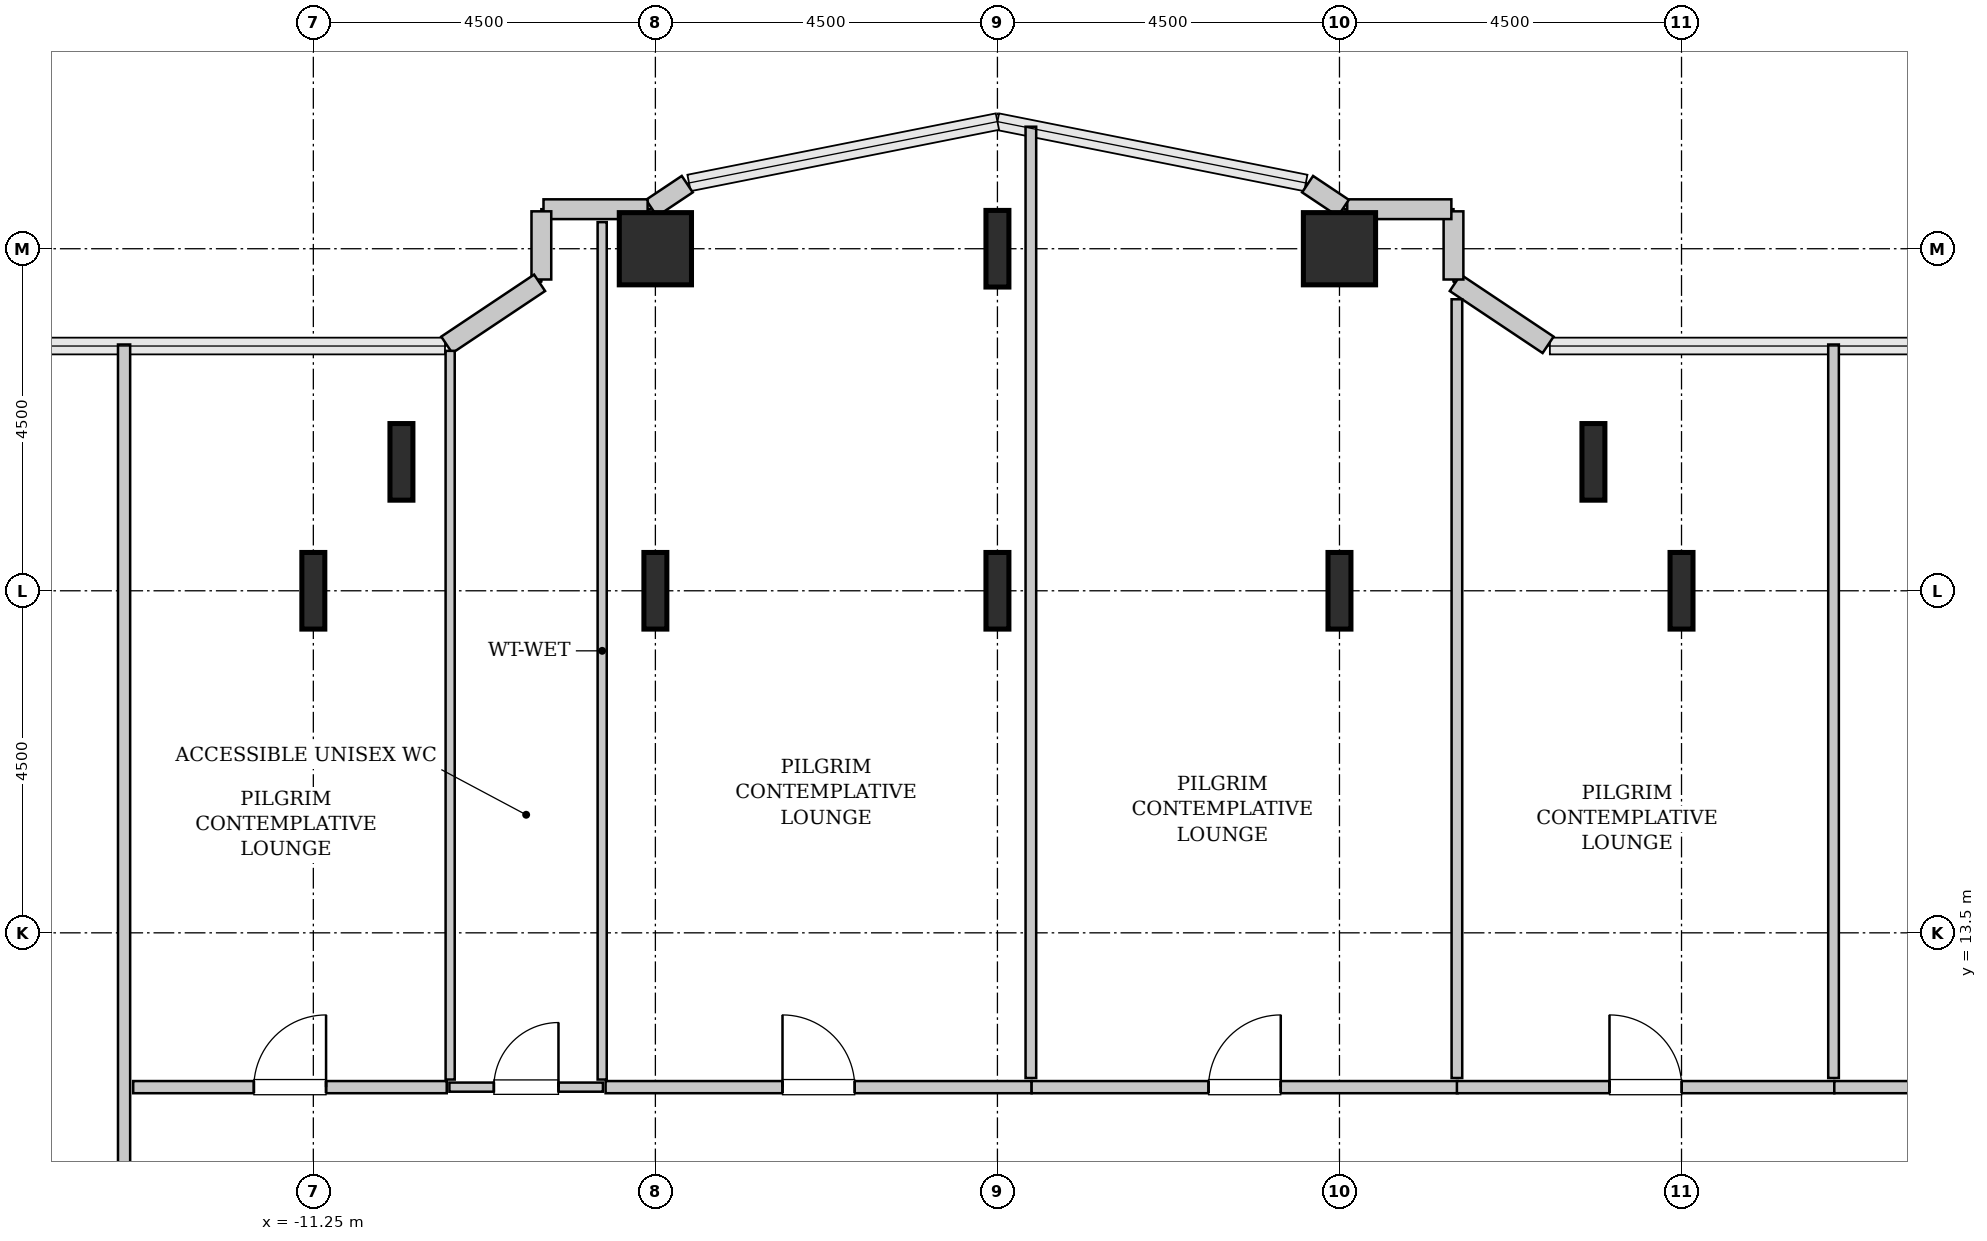
"""IFC4 building model, lengths in metres.
Left out: names, types, materials, properties, quantities, classifications, styles, units other than length and angle.
Written with IfcOpenShell. Run it as: python <this file> out.ifc"""

import sys

from ifc_helpers import new_model, si_unit, direction, frame, frame_2d, origin, origin_2d, place, context, subcontext, project, spatial, rectangle, hollow_rectangle, i_section, extrude, source, transform, mapped, element, fill, save


model = new_model("IFC4")
c1 = context("Model", 3, precision=1e-05, world=origin(), true_north=direction((0.0, 1.0)))
c2 = subcontext(c1, "Body", "Model", "MODEL_VIEW")
j1 = project(units=[si_unit("LENGTHUNIT", "METRE"), si_unit("PLANEANGLEUNIT", "RADIAN")], contexts=[c1])
p1 = place(None, origin())
s1 = spatial("IfcSite", under=j1, at=p1, CompositionType="ELEMENT")
p2 = place(p1, origin())
s2 = spatial("IfcBuilding", under=s1, at=p2, CompositionType="ELEMENT")
p3 = place(p2, frame((0.0, 0.0, 82.4)))
s3 = spatial("IfcBuildingStorey", under=s2, at=p3, CompositionType="ELEMENT", Elevation=82.4)
m1 = source(origin(), c2, "Body", "SweptSolid", [
    extrude(i_section(OverallWidth=0.302, OverallDepth=1.008, WebThickness=0.021, FlangeThickness=0.04, FilletRadius=0.03, at=origin_2d()), origin(), (0.0, 0.0, 1.0), 3.8),
])
for number, where, z_axis, x_axis in (
    (1, (-11.25, 18.0, 0.0), (0.0, 0.0, 1.0), (1.0, 0.0, 0.0)),
    (2, (-10.091, 19.696, 0.0), (0.0, 0.0, 1.0), (1.0, 0.0, 0.0)),
    (3, (-6.75, 18.0, 0.0), (0.0, 0.0, 1.0), (1.0, 0.0, 0.0)),
):
    element("IfcColumn", number, at=place(p3, frame(where, z_axis=z_axis, x_axis=x_axis)), inside=s3, PredefinedType="COLUMN", context=c2, shape_type="MappedRepresentation", body=[
        mapped(m1, transform((0.0, 0.0, 0.0), x_axis=(1.0, 0.0, 0.0), y_axis=(0.0, 1.0, 0.0), z_axis=(0.0, 0.0, 1.0), scale=1.0)),
    ])
m2 = source(origin(), c2, "Body", "SweptSolid", [
    extrude(hollow_rectangle(XDim=0.95, YDim=0.95, WallThickness=0.045, InnerFilletRadius=0.045, OuterFilletRadius=0.09, at=origin_2d()), origin(), (0.0, 0.0, 1.0), 3.8),
])
p4 = place(p3, frame((-6.75, 22.5, 0.0), z_axis=(0.0, 0.0, 1.0), x_axis=(1.0, 0.0, 0.0)))
e4 = element("IfcColumn", 4, at=p4, inside=s3, PredefinedType="COLUMN", context=c2, shape_type="MappedRepresentation", body=[
    mapped(m2, transform((0.0, 0.0, 0.0), x_axis=(1.0, 0.0, 0.0), y_axis=(0.0, 1.0, 0.0), z_axis=(0.0, 0.0, 1.0), scale=1.0)),
])
for number, where, z_axis, x_axis in (
    (5, (-2.25, 18.0, 0.0), (0.0, 0.0, 1.0), (1.0, 0.0, 0.0)),
    (6, (-2.25, 22.5, 0.0), (0.0, 0.0, 1.0), (1.0, 0.0, 0.0)),
    (7, (2.25, 18.0, 0.0), (0.0, 0.0, 1.0), (1.0, 0.0, 0.0)),
):
    element("IfcColumn", number, at=place(p3, frame(where, z_axis=z_axis, x_axis=x_axis)), inside=s3, PredefinedType="COLUMN", context=c2, shape_type="MappedRepresentation", body=[
        mapped(m1, transform((0.0, 0.0, 0.0), x_axis=(1.0, 0.0, 0.0), y_axis=(0.0, 1.0, 0.0), z_axis=(0.0, 0.0, 1.0), scale=1.0)),
    ])
p5 = place(p3, frame((2.25, 22.5, 0.0), z_axis=(0.0, 0.0, 1.0), x_axis=(1.0, 0.0, 0.0)))
e8 = element("IfcColumn", 8, at=p5, inside=s3, PredefinedType="COLUMN", context=c2, shape_type="MappedRepresentation", body=[
    mapped(m2, transform((0.0, 0.0, 0.0), x_axis=(1.0, 0.0, 0.0), y_axis=(0.0, 1.0, 0.0), z_axis=(0.0, 0.0, 1.0), scale=1.0)),
])
for number, where, z_axis, x_axis in (
    (9, (5.591, 19.696, 0.0), (0.0, 0.0, 1.0), (1.0, 0.0, 0.0)),
    (10, (6.75, 18.0, 0.0), (0.0, 0.0, 1.0), (1.0, 0.0, 0.0)),
):
    element("IfcColumn", number, at=place(p3, frame(where, z_axis=z_axis, x_axis=x_axis)), inside=s3, PredefinedType="COLUMN", context=c2, shape_type="MappedRepresentation", body=[
        mapped(m1, transform((0.0, 0.0, 0.0), x_axis=(1.0, 0.0, 0.0), y_axis=(0.0, 1.0, 0.0), z_axis=(0.0, 0.0, 1.0), scale=1.0)),
    ])
m3 = source(origin(), c2, "Body", "SweptSolid", [
    extrude(rectangle(XDim=1.469, YDim=0.26, at=frame_2d((0.734, 0.0))), origin(), (0.0, 0.0, 1.0), 3.5),
])
p6 = place(p3, frame((4.995, 21.236, 0.0), z_axis=(0.0, 0.0, 1.0), x_axis=(-0.831461760506, 0.555581983884, 0.0)))
e11 = element("IfcWall", 11, at=p6, inside=s3, PredefinedType="SOLIDWALL", context=c2, shape_type="MappedRepresentation", body=[
    mapped(m3, transform((0.0, 0.0, 0.0), x_axis=(1.0, 0.0, 0.0), y_axis=(0.0, 1.0, 0.0), z_axis=(0.0, 0.0, 1.0), scale=1.0)),
])
m4 = source(origin(), c2, "Body", "SweptSolid", [
    extrude(rectangle(XDim=0.897, YDim=0.26, at=frame_2d((0.448, 0.0))), origin(), (0.0, 0.0, 1.0), 3.5),
])
p7 = place(p3, frame((3.75, 22.095, 0.0), z_axis=(0.0, 0.0, 1.0), x_axis=(0.0, 1.0, 0.0)))
e12 = element("IfcWall", 12, at=p7, inside=s3, PredefinedType="SOLIDWALL", context=c2, shape_type="MappedRepresentation", body=[
    mapped(m4, transform((0.0, 0.0, 0.0), x_axis=(1.0, 0.0, 0.0), y_axis=(0.0, 1.0, 0.0), z_axis=(0.0, 0.0, 1.0), scale=1.0)),
])
m5 = source(origin(), c2, "Body", "SweptSolid", [
    extrude(rectangle(XDim=1.37, YDim=0.26, at=frame_2d((0.685, 0.0))), origin(), (0.0, 0.0, 1.0), 3.5),
])
p8 = place(p3, frame((3.722, 23.02, 0.0), z_axis=(0.0, 0.0, 1.0), x_axis=(-1.0, 0.0, 0.0)))
e13 = element("IfcWall", 13, at=p8, inside=s3, PredefinedType="SOLIDWALL", context=c2, shape_type="MappedRepresentation", body=[
    mapped(m5, transform((0.0, 0.0, 0.0), x_axis=(1.0, 0.0, 0.0), y_axis=(0.0, 1.0, 0.0), z_axis=(0.0, 0.0, 1.0), scale=1.0)),
])
m6 = source(origin(), c2, "Body", "SweptSolid", [
    extrude(rectangle(XDim=0.565, YDim=0.26, at=frame_2d((0.283, 0.0))), origin(), (0.0, 0.0, 1.0), 3.5),
])
for number, where, z_axis, x_axis in (
    (14, (2.301, 23.036, 0.0), (0.0, 0.0, 1.0), (-0.832, 0.555, 0.0)),
    (15, (-6.331, 23.35, 0.0), (0.0, 0.0, 1.0), (-0.832, -0.555, 0.0)),
):
    element("IfcWall", number, at=place(p3, frame(where, z_axis=z_axis, x_axis=x_axis)), inside=s3, PredefinedType="SOLIDWALL", context=c2, shape_type="MappedRepresentation", body=[
        mapped(m6, transform((0.0, 0.0, 0.0), x_axis=(1.0, 0.0, 0.0), y_axis=(0.0, 1.0, 0.0), z_axis=(0.0, 0.0, 1.0), scale=1.0)),
    ])
p9 = place(p3, frame((-6.852, 23.02, 0.0), z_axis=(0.0, 0.0, 1.0), x_axis=(-1.0, 0.0, 0.0)))
e16 = element("IfcWall", 16, at=p9, inside=s3, PredefinedType="SOLIDWALL", context=c2, shape_type="MappedRepresentation", body=[
    mapped(m5, transform((0.0, 0.0, 0.0), x_axis=(1.0, 0.0, 0.0), y_axis=(0.0, 1.0, 0.0), z_axis=(0.0, 0.0, 1.0), scale=1.0)),
])
p10 = place(p3, frame((-8.25, 22.992, 0.0), z_axis=(0.0, 0.0, 1.0), x_axis=(0.0, -1.0, 0.0)))
e17 = element("IfcWall", 17, at=p10, inside=s3, PredefinedType="SOLIDWALL", context=c2, shape_type="MappedRepresentation", body=[
    mapped(m4, transform((0.0, 0.0, 0.0), x_axis=(1.0, 0.0, 0.0), y_axis=(0.0, 1.0, 0.0), z_axis=(0.0, 0.0, 1.0), scale=1.0)),
])
p11 = place(p3, frame((-8.273, 22.052, 0.0), z_axis=(0.0, 0.0, 1.0), x_axis=(-0.831461760506, -0.555581983884, 0.0)))
e18 = element("IfcWall", 18, at=p11, inside=s3, PredefinedType="SOLIDWALL", context=c2, shape_type="MappedRepresentation", body=[
    mapped(m3, transform((0.0, 0.0, 0.0), x_axis=(1.0, 0.0, 0.0), y_axis=(0.0, 1.0, 0.0), z_axis=(0.0, 0.0, 1.0), scale=1.0)),
])
m7 = source(origin(), c2, "Body", "SweptSolid", [
    extrude(rectangle(XDim=2.02, YDim=0.12, at=frame_2d((1.01, 0.0))), origin(), (0.0, 0.0, 1.0), 3.485),
])
p12 = place(p3, frame((-9.46, 11.47, 0.0), z_axis=(0.0, 0.0, 1.0), x_axis=(1.0, 0.0, 0.0)))
e19 = element("IfcWall", 19, at=p12, inside=s3, PredefinedType="PLUMBINGWALL", context=c2, shape_type="MappedRepresentation", body=[
    mapped(m7, transform((0.0, 0.0, 0.0), x_axis=(1.0, 0.0, 0.0), y_axis=(0.0, 1.0, 0.0), z_axis=(0.0, 0.0, 1.0), scale=1.0)),
])
p13 = place(p12, frame((0.585, 0.0, 0.0)))
e20 = element("IfcOpeningElement", 20, at=p13, cuts=e19, PredefinedType="OPENING", context=c2, shape_type="SweptSolid", body=[
    extrude(rectangle(XDim=0.85, YDim=2.1, at=frame_2d((0.425, 1.05))), frame((0.0, 0.07, 0.0), z_axis=(0.0, -1.0, 0.0), x_axis=(1.0, 0.0, 0.0)), (0.0, 0.0, 1.0), 0.14),
])
m8 = source(origin(), c2, "Body", "SweptSolid", [
    extrude(rectangle(XDim=11.28, YDim=0.12, at=frame_2d((5.64, 0.0))), origin(), (0.0, 0.0, 1.0), 3.485),
])
p14 = place(p3, frame((-7.45, 11.57, 0.0), z_axis=(0.0, 0.0, 1.0), x_axis=(0.0, 1.0, 0.0)))
e21 = element("IfcWall", 21, at=p14, inside=s3, PredefinedType="PLUMBINGWALL", context=c2, shape_type="MappedRepresentation", body=[
    mapped(m8, transform((0.0, 0.0, 0.0), x_axis=(1.0, 0.0, 0.0), y_axis=(0.0, 1.0, 0.0), z_axis=(0.0, 0.0, 1.0), scale=1.0)),
])
m9 = source(origin(), c2, "Body", "SweptSolid", [
    extrude(rectangle(XDim=9.587, YDim=0.12, at=frame_2d((4.793, 0.0))), origin(), (0.0, 0.0, 1.0), 3.485),
])
p15 = place(p3, frame((-9.45, 11.57, 0.0), z_axis=(0.0, 0.0, 1.0), x_axis=(0.0, 1.0, 0.0)))
e22 = element("IfcWall", 22, at=p15, inside=s3, PredefinedType="PLUMBINGWALL", context=c2, shape_type="MappedRepresentation", body=[
    mapped(m9, transform((0.0, 0.0, 0.0), x_axis=(1.0, 0.0, 0.0), y_axis=(0.0, 1.0, 0.0), z_axis=(0.0, 0.0, 1.0), scale=1.0)),
])
m10 = source(origin(), c2, "Body", "SweptSolid", [
    extrude(rectangle(XDim=13.153, YDim=0.16, at=frame_2d((6.576, 0.0))), origin(), (0.0, 0.0, 1.0), 3.485),
])
p16 = place(p3, frame((-13.74, 8.087, 0.0), z_axis=(0.0, 0.0, 1.0), x_axis=(0.0, 1.0, 0.0)))
e23 = element("IfcWall", 23, at=p16, inside=s3, PredefinedType="PARTITIONING", context=c2, shape_type="MappedRepresentation", body=[
    mapped(m10, transform((0.0, 0.0, 0.0), x_axis=(1.0, 0.0, 0.0), y_axis=(0.0, 1.0, 0.0), z_axis=(0.0, 0.0, 1.0), scale=1.0)),
])
p17 = place(p16, frame((1.236, 0.0, 0.0)))
e24 = element("IfcOpeningElement", 24, at=p17, cuts=e23, PredefinedType="OPENING", context=c2, shape_type="SweptSolid", body=[
    extrude(rectangle(XDim=0.95, YDim=2.1, at=frame_2d((0.475, 1.05))), frame((0.0, 0.09, 0.0), z_axis=(0.0, -1.0, 0.0), x_axis=(1.0, 0.0, 0.0)), (0.0, 0.0, 1.0), 0.18),
])
m11 = source(origin(), c2, "Body", "SweptSolid", [
    extrude(rectangle(XDim=4.125, YDim=0.16, at=frame_2d((2.062, 0.0))), origin(), (0.0, 0.0, 1.0), 3.485),
])
p18 = place(p3, frame((-13.62, 11.47, 0.0), z_axis=(0.0, 0.0, 1.0), x_axis=(1.0, 0.0, 0.0)))
e25 = element("IfcWall", 25, at=p18, inside=s3, PredefinedType="PARTITIONING", context=c2, shape_type="MappedRepresentation", body=[
    mapped(m11, transform((0.0, 0.0, 0.0), x_axis=(1.0, 0.0, 0.0), y_axis=(0.0, 1.0, 0.0), z_axis=(0.0, 0.0, 1.0), scale=1.0)),
])
p19 = place(p18, frame((1.587, 0.0, 0.0)))
e26 = element("IfcOpeningElement", 26, at=p19, cuts=e25, PredefinedType="OPENING", context=c2, shape_type="SweptSolid", body=[
    extrude(rectangle(XDim=0.95, YDim=2.1, at=frame_2d((0.475, 1.05))), frame((0.0, 0.09, 0.0), z_axis=(0.0, -1.0, 0.0), x_axis=(1.0, 0.0, 0.0)), (0.0, 0.0, 1.0), 0.18),
])
m12 = source(origin(), c2, "Body", "SweptSolid", [
    extrude(rectangle(XDim=5.605, YDim=0.16, at=frame_2d((2.802, 0.0))), origin(), (0.0, 0.0, 1.0), 3.485),
])
p20 = place(p3, frame((-7.405, 11.47, 0.0), z_axis=(0.0, 0.0, 1.0), x_axis=(1.0, 0.0, 0.0)))
e27 = element("IfcWall", 27, at=p20, inside=s3, PredefinedType="PARTITIONING", context=c2, shape_type="MappedRepresentation", body=[
    mapped(m12, transform((0.0, 0.0, 0.0), x_axis=(1.0, 0.0, 0.0), y_axis=(0.0, 1.0, 0.0), z_axis=(0.0, 0.0, 1.0), scale=1.0)),
])
p21 = place(p20, frame((2.327, 0.0, 0.0)))
e28 = element("IfcOpeningElement", 28, at=p21, cuts=e27, PredefinedType="OPENING", context=c2, shape_type="SweptSolid", body=[
    extrude(rectangle(XDim=0.95, YDim=2.1, at=frame_2d((0.475, 1.05))), frame((0.0, 0.09, 0.0), z_axis=(0.0, -1.0, 0.0), x_axis=(1.0, 0.0, 0.0)), (0.0, 0.0, 1.0), 0.18),
])
m13 = source(origin(), c2, "Body", "SweptSolid", [
    extrude(rectangle(XDim=12.515, YDim=0.14, at=frame_2d((6.258, 0.0))), origin(), (0.0, 0.0, 1.0), 2.775),
])
p22 = place(p3, frame((-1.81, 11.59, 0.0), z_axis=(0.0, 0.0, 1.0), x_axis=(0.0, 1.0, 0.0)))
e29 = element("IfcWall", 29, at=p22, inside=s3, PredefinedType="PARTITIONING", context=c2, shape_type="MappedRepresentation", body=[
    mapped(m13, transform((0.0, 0.0, 0.0), x_axis=(1.0, 0.0, 0.0), y_axis=(0.0, 1.0, 0.0), z_axis=(0.0, 0.0, 1.0), scale=1.0)),
])
p23 = place(p3, frame((-1.8, 11.47, 0.0), z_axis=(0.0, 0.0, 1.0), x_axis=(1.0, 0.0, 0.0)))
e30 = element("IfcWall", 30, at=p23, inside=s3, PredefinedType="PARTITIONING", context=c2, shape_type="MappedRepresentation", body=[
    mapped(m12, transform((0.0, 0.0, 0.0), x_axis=(1.0, 0.0, 0.0), y_axis=(0.0, 1.0, 0.0), z_axis=(0.0, 0.0, 1.0), scale=1.0)),
])
p24 = place(p23, frame((2.327, 0.0, 0.0)))
e31 = element("IfcOpeningElement", 31, at=p24, cuts=e30, PredefinedType="OPENING", context=c2, shape_type="SweptSolid", body=[
    extrude(rectangle(XDim=0.95, YDim=2.1, at=frame_2d((0.475, 1.05))), frame((0.0, 0.09, 0.0), z_axis=(0.0, -1.0, 0.0), x_axis=(1.0, 0.0, 0.0)), (0.0, 0.0, 1.0), 0.18),
])
m14 = source(origin(), c2, "Body", "SweptSolid", [
    extrude(rectangle(XDim=10.245, YDim=0.14, at=frame_2d((5.123, 0.0))), origin(), (0.0, 0.0, 1.0), 3.485),
])
p25 = place(p3, frame((3.795, 11.59, 0.0), z_axis=(0.0, 0.0, 1.0), x_axis=(0.0, 1.0, 0.0)))
e32 = element("IfcWall", 32, at=p25, inside=s3, PredefinedType="PARTITIONING", context=c2, shape_type="MappedRepresentation", body=[
    mapped(m14, transform((0.0, 0.0, 0.0), x_axis=(1.0, 0.0, 0.0), y_axis=(0.0, 1.0, 0.0), z_axis=(0.0, 0.0, 1.0), scale=1.0)),
])
m15 = source(origin(), c2, "Body", "SweptSolid", [
    extrude(rectangle(XDim=4.965, YDim=0.16, at=frame_2d((2.482, 0.0))), origin(), (0.0, 0.0, 1.0), 3.485),
])
p26 = place(p3, frame((3.795, 11.47, 0.0), z_axis=(0.0, 0.0, 1.0), x_axis=(1.0, 0.0, 0.0)))
e33 = element("IfcWall", 33, at=p26, inside=s3, PredefinedType="PARTITIONING", context=c2, shape_type="MappedRepresentation", body=[
    mapped(m15, transform((0.0, 0.0, 0.0), x_axis=(1.0, 0.0, 0.0), y_axis=(0.0, 1.0, 0.0), z_axis=(0.0, 0.0, 1.0), scale=1.0)),
])
p27 = place(p26, frame((2.008, 0.0, 0.0)))
e34 = element("IfcOpeningElement", 34, at=p27, cuts=e33, PredefinedType="OPENING", context=c2, shape_type="SweptSolid", body=[
    extrude(rectangle(XDim=0.95, YDim=2.1, at=frame_2d((0.475, 1.05))), frame((0.0, 0.09, 0.0), z_axis=(0.0, -1.0, 0.0), x_axis=(1.0, 0.0, 0.0)), (0.0, 0.0, 1.0), 0.18),
])
m16 = source(origin(), c2, "Body", "SweptSolid", [
    extrude(rectangle(XDim=9.65, YDim=0.14, at=frame_2d((4.825, 0.0))), origin(), (0.0, 0.0, 1.0), 3.485),
])
p28 = place(p3, frame((8.75, 11.59, 0.0), z_axis=(0.0, 0.0, 1.0), x_axis=(0.0, 1.0, 0.0)))
e35 = element("IfcWall", 35, at=p28, inside=s3, PredefinedType="PARTITIONING", context=c2, shape_type="MappedRepresentation", body=[
    mapped(m16, transform((0.0, 0.0, 0.0), x_axis=(1.0, 0.0, 0.0), y_axis=(0.0, 1.0, 0.0), z_axis=(0.0, 0.0, 1.0), scale=1.0)),
])
m17 = source(origin(), c2, "Body", "SweptSolid", [
    extrude(rectangle(XDim=4.86, YDim=0.16, at=frame_2d((2.43, 0.0))), origin(), (0.0, 0.0, 1.0), 3.485),
])
p29 = place(p3, frame((8.76, 11.47, 0.0), z_axis=(0.0, 0.0, 1.0), x_axis=(1.0, 0.0, 0.0)))
e36 = element("IfcWall", 36, at=p29, inside=s3, PredefinedType="PARTITIONING", context=c2, shape_type="MappedRepresentation", body=[
    mapped(m17, transform((0.0, 0.0, 0.0), x_axis=(1.0, 0.0, 0.0), y_axis=(0.0, 1.0, 0.0), z_axis=(0.0, 0.0, 1.0), scale=1.0)),
])
p30 = place(p29, frame((1.955, 0.0, 0.0)))
e37 = element("IfcOpeningElement", 37, at=p30, cuts=e36, PredefinedType="OPENING", context=c2, shape_type="SweptSolid", body=[
    extrude(rectangle(XDim=0.95, YDim=2.1, at=frame_2d((0.475, 1.05))), frame((0.0, 0.09, 0.0), z_axis=(0.0, -1.0, 0.0), x_axis=(1.0, 0.0, 0.0)), (0.0, 0.0, 1.0), 0.18),
])
m18 = source(origin(), c2, "Body", "SweptSolid", [
    extrude(rectangle(XDim=0.85, YDim=2.1, at=frame_2d((0.425, 1.05))), frame((0.0, 0.025, 0.0), z_axis=(0.0, -1.0, 0.0), x_axis=(1.0, 0.0, 0.0)), (0.0, 0.0, 1.0), 0.05),
])
p31 = place(p13, origin())
e38 = element("IfcDoor", 38, at=p31, inside=s3, OperationType="SINGLE_SWING_RIGHT", PredefinedType="DOOR", context=c2, shape_type="MappedRepresentation", body=[
    mapped(m18, transform((0.0, 0.0, 0.0), x_axis=(1.0, 0.0, 0.0), y_axis=(0.0, 1.0, 0.0), z_axis=(0.0, 0.0, 1.0), scale=1.0)),
])
fill(e20, e38)
m19 = source(origin(), c2, "Body", "SweptSolid", [
    extrude(rectangle(XDim=0.95, YDim=2.1, at=frame_2d((0.475, 1.05))), frame((0.0, 0.025, 0.0), z_axis=(0.0, -1.0, 0.0), x_axis=(1.0, 0.0, 0.0)), (0.0, 0.0, 1.0), 0.05),
])
p32 = place(p19, origin())
e39 = element("IfcDoor", 39, at=p32, inside=s3, OperationType="SINGLE_SWING_RIGHT", PredefinedType="DOOR", context=c2, shape_type="MappedRepresentation", body=[
    mapped(m19, transform((0.0, 0.0, 0.0), x_axis=(1.0, 0.0, 0.0), y_axis=(0.0, 1.0, 0.0), z_axis=(0.0, 0.0, 1.0), scale=1.0)),
])
fill(e26, e39)
p33 = place(p21, origin())
e40 = element("IfcDoor", 40, at=p33, inside=s3, OperationType="SINGLE_SWING_LEFT", PredefinedType="DOOR", context=c2, shape_type="MappedRepresentation", body=[
    mapped(m19, transform((0.0, 0.0, 0.0), x_axis=(1.0, 0.0, 0.0), y_axis=(0.0, 1.0, 0.0), z_axis=(0.0, 0.0, 1.0), scale=1.0)),
])
fill(e28, e40)
p34 = place(p24, origin())
e41 = element("IfcDoor", 41, at=p34, inside=s3, OperationType="SINGLE_SWING_RIGHT", PredefinedType="DOOR", context=c2, shape_type="MappedRepresentation", body=[
    mapped(m19, transform((0.0, 0.0, 0.0), x_axis=(1.0, 0.0, 0.0), y_axis=(0.0, 1.0, 0.0), z_axis=(0.0, 0.0, 1.0), scale=1.0)),
])
fill(e31, e41)
p35 = place(p27, origin())
e42 = element("IfcDoor", 42, at=p35, inside=s3, OperationType="SINGLE_SWING_LEFT", PredefinedType="DOOR", context=c2, shape_type="MappedRepresentation", body=[
    mapped(m19, transform((0.0, 0.0, 0.0), x_axis=(1.0, 0.0, 0.0), y_axis=(0.0, 1.0, 0.0), z_axis=(0.0, 0.0, 1.0), scale=1.0)),
])
fill(e34, e42)
save(model, sys.argv[1])
